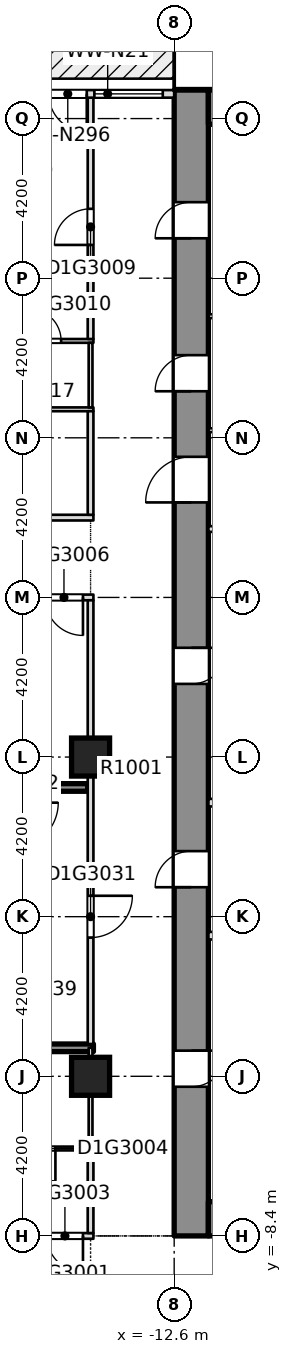
"""IFC4 building model, lengths in metres.
Left out: names, types, materials, properties, quantities, classifications, styles, units other than length and angle.
Written with IfcOpenShell. Run it as: python <this file> out.ifc"""

import sys

from ifc_helpers import new_model, si_unit, direction, frame, frame_2d, origin, origin_2d, place, context, subcontext, project, spatial, rectangle, extrude, element, fill, save


model = new_model("IFC4")
c1 = context("Model", 3, precision=1e-05, world=origin(), true_north=direction((0.0, 1.0)))
c2 = subcontext(c1, "Body", "Model", "MODEL_VIEW")
j1 = project(units=[si_unit("LENGTHUNIT", "METRE"), si_unit("PLANEANGLEUNIT", "RADIAN")], contexts=[c1])
p1 = place(None, origin())
s1 = spatial("IfcSite", under=j1, at=p1, CompositionType="ELEMENT")
p2 = place(p1, origin())
s2 = spatial("IfcBuilding", under=s1, at=p2, CompositionType="ELEMENT")
p3 = place(p2, frame((0.0, 0.0, 48.3)))
s3 = spatial("IfcBuildingStorey", under=s2, at=p3, CompositionType="ELEMENT", Elevation=48.3)
p4 = place(p3, frame((-12.15, -8.4, -0.32), z_axis=(0.0, 0.0, 1.0), x_axis=(0.0, 1.0, 0.0)))
e1 = element("IfcWall", 1, at=p4, inside=s3, PredefinedType="SHEAR", context=c2, shape_type="SweptSolid", body=[
    extrude(rectangle(XDim=30.15, YDim=0.9, at=frame_2d((15.075, 0.0))), origin(), (0.0, 0.0, 1.0), 3.45),
])
p5 = place(p4, frame((3.925, 0.0, 0.32)))
e2 = element("IfcOpeningElement", 2, at=p5, cuts=e1, PredefinedType="OPENING", context=c2, shape_type="SweptSolid", body=[
    extrude(rectangle(XDim=0.95, YDim=2.1, at=frame_2d((0.475, 1.05))), frame((0.0, 0.46, 0.0), z_axis=(0.0, -1.0, 0.0), x_axis=(1.0, 0.0, 0.0)), (0.0, 0.0, 1.0), 0.92),
])
p6 = place(p4, frame((9.175, 0.0, 0.32)))
e3 = element("IfcOpeningElement", 3, at=p6, cuts=e1, PredefinedType="OPENING", context=c2, shape_type="SweptSolid", body=[
    extrude(rectangle(XDim=0.95, YDim=2.1, at=frame_2d((0.475, 1.05))), frame((0.0, 0.46, 0.0), z_axis=(0.0, -1.0, 0.0), x_axis=(1.0, 0.0, 0.0)), (0.0, 0.0, 1.0), 0.92),
])
p7 = place(p4, frame((14.525, 0.0, 0.32)))
e4 = element("IfcOpeningElement", 4, at=p7, cuts=e1, PredefinedType="OPENING", context=c2, shape_type="SweptSolid", body=[
    extrude(rectangle(XDim=0.95, YDim=2.1, at=frame_2d((0.475, 1.05))), frame((0.0, 0.46, 0.0), z_axis=(0.0, -1.0, 0.0), x_axis=(1.0, 0.0, 0.0)), (0.0, 0.0, 1.0), 0.92),
])
p8 = place(p4, frame((22.225, 0.0, 0.32)))
e5 = element("IfcOpeningElement", 5, at=p8, cuts=e1, PredefinedType="OPENING", context=c2, shape_type="SweptSolid", body=[
    extrude(rectangle(XDim=0.95, YDim=2.1, at=frame_2d((0.475, 1.05))), frame((0.0, 0.46, 0.0), z_axis=(0.0, -1.0, 0.0), x_axis=(1.0, 0.0, 0.0)), (0.0, 0.0, 1.0), 0.92),
])
p9 = place(p4, frame((26.25, 0.0, 0.32)))
e6 = element("IfcOpeningElement", 6, at=p9, cuts=e1, PredefinedType="OPENING", context=c2, shape_type="SweptSolid", body=[
    extrude(rectangle(XDim=0.95, YDim=2.1, at=frame_2d((0.475, 1.05))), frame((0.0, 0.46, 0.0), z_axis=(0.0, -1.0, 0.0), x_axis=(1.0, 0.0, 0.0)), (0.0, 0.0, 1.0), 0.92),
])
p10 = place(p4, frame((19.3, 0.0, 0.32)))
e7 = element("IfcOpeningElement", 7, at=p10, cuts=e1, PredefinedType="OPENING", context=c2, shape_type="SweptSolid", body=[
    extrude(rectangle(XDim=1.2, YDim=2.1, at=frame_2d((0.6, 1.05))), frame((0.0, 0.46, 0.0), z_axis=(0.0, -1.0, 0.0), x_axis=(1.0, 0.0, 0.0)), (0.0, 0.0, 1.0), 0.92),
])
p11 = place(p3, frame((-11.7, -7.95, -0.32), z_axis=(0.0, 0.0, 1.0), x_axis=(1.0, 0.0, 0.0)))
e8 = element("IfcWall", 8, at=p11, inside=s3, PredefinedType="SHEAR", context=c2, shape_type="SweptSolid", body=[
    extrude(rectangle(XDim=23.4, YDim=0.9, at=frame_2d((11.7, 0.0))), origin(), (0.0, 0.0, 1.0), 3.45),
])
p12 = place(p11, frame((6.95, 0.0, 0.32)))
e9 = element("IfcOpeningElement", 9, at=p12, cuts=e8, PredefinedType="OPENING", context=c2, shape_type="SweptSolid", body=[
    extrude(rectangle(XDim=1.8, YDim=2.1, at=frame_2d((0.9, 1.05))), frame((0.0, 0.46, 0.0), z_axis=(0.0, -1.0, 0.0), x_axis=(1.0, 0.0, 0.0)), (0.0, 0.0, 1.0), 0.92),
])
p13 = place(p11, frame((14.65, 0.0, 0.32)))
e10 = element("IfcOpeningElement", 10, at=p13, cuts=e8, PredefinedType="OPENING", context=c2, shape_type="SweptSolid", body=[
    extrude(rectangle(XDim=1.8, YDim=2.1, at=frame_2d((0.9, 1.05))), frame((0.0, 0.46, 0.0), z_axis=(0.0, -1.0, 0.0), x_axis=(1.0, 0.0, 0.0)), (0.0, 0.0, 1.0), 0.92),
])
p14 = place(p3, frame((-11.7, 21.3, -0.32), z_axis=(0.0, 0.0, 1.0), x_axis=(1.0, 0.0, 0.0)))
e11 = element("IfcWall", 11, at=p14, inside=s3, PredefinedType="SOLIDWALL", context=c2, shape_type="SweptSolid", body=[
    extrude(rectangle(XDim=23.4, YDim=0.9, at=frame_2d((11.7, 0.0))), origin(), (0.0, 0.0, 1.0), 3.45),
])
for number, where, z_axis, x_axis in (
    (12, (-14.8, -4.2, -0.32), (0.0, 0.0, 1.0), (1.0, 0.0, 0.0)),
    (13, (-14.8, 4.2, -0.32), (0.0, 0.0, 1.0), (1.0, 0.0, 0.0)),
):
    element("IfcColumn", number, at=place(p3, frame(where, z_axis=z_axis, x_axis=x_axis)), inside=s3, PredefinedType="COLUMN", context=c2, shape_type="SweptSolid", body=[
        extrude(rectangle(XDim=1.0, YDim=1.0, at=origin_2d()), origin(), (0.0, 0.0, 1.0), 3.45),
    ])
p15 = place(p3, frame((-25.75, -8.4, 0.0), z_axis=(0.0, 0.0, 1.0), x_axis=(1.0, 0.0, 0.0)))
e14 = element("IfcWall", 14, at=p15, inside=s3, PredefinedType="PARTITIONING", context=c2, shape_type="SweptSolid", body=[
    extrude(rectangle(XDim=11.025, YDim=0.15, at=frame_2d((5.512, 0.0))), origin(), (0.0, 0.0, 1.0), 3.13),
])
p16 = place(p15, frame((9.8, 0.0, 0.0)))
e15 = element("IfcOpeningElement", 15, at=p16, cuts=e14, PredefinedType="OPENING", context=c2, shape_type="SweptSolid", body=[
    extrude(rectangle(XDim=0.95, YDim=2.1, at=frame_2d((0.475, 1.05))), frame((0.0, 0.085, 0.0), z_axis=(0.0, -1.0, 0.0), x_axis=(1.0, 0.0, 0.0)), (0.0, 0.0, 1.0), 0.17),
])
p17 = place(p3, frame((-17.55, -6.1, 0.0), z_axis=(0.0, 0.0, 1.0), x_axis=(1.0, 0.0, 0.0)))
e16 = element("IfcWall", 16, at=p17, inside=s3, PredefinedType="PARTITIONING", context=c2, shape_type="SweptSolid", body=[
    extrude(rectangle(XDim=2.825, YDim=0.1, at=frame_2d((1.413, 0.0))), origin(), (0.0, 0.0, 1.0), 3.13),
])
p18 = place(p17, frame((0.975, 0.0, 0.0)))
e17 = element("IfcOpeningElement", 17, at=p18, cuts=e16, PredefinedType="OPENING", context=c2, shape_type="SweptSolid", body=[
    extrude(rectangle(XDim=0.85, YDim=2.1, at=frame_2d((0.425, 1.05))), frame((0.0, 0.06, 0.0), z_axis=(0.0, -1.0, 0.0), x_axis=(1.0, 0.0, 0.0)), (0.0, 0.0, 1.0), 0.12),
])
p19 = place(p3, frame((-17.55, -3.45, 0.0), z_axis=(0.0, 0.0, 1.0), x_axis=(1.0, 0.0, 0.0)))
e18 = element("IfcWall", 18, at=p19, inside=s3, PredefinedType="SOLIDWALL", context=c2, shape_type="SweptSolid", body=[
    extrude(rectangle(XDim=2.825, YDim=0.2, at=frame_2d((1.413, 0.0))), origin(), (0.0, 0.0, 1.0), 3.13),
])
p20 = place(p3, frame((-20.45, 3.4, 0.0), z_axis=(0.0, 0.0, 1.0), x_axis=(1.0, 0.0, 0.0)))
e19 = element("IfcWall", 19, at=p20, inside=s3, PredefinedType="SOLIDWALL", context=c2, shape_type="SweptSolid", body=[
    extrude(rectangle(XDim=5.575, YDim=0.2, at=frame_2d((2.788, 0.0))), origin(), (0.0, 0.0, 1.0), 3.13),
])
p21 = place(p3, frame((-25.75, 8.4, 0.0), z_axis=(0.0, 0.0, 1.0), x_axis=(1.0, 0.0, 0.0)))
e20 = element("IfcWall", 20, at=p21, inside=s3, PredefinedType="PARTITIONING", context=c2, shape_type="SweptSolid", body=[
    extrude(rectangle(XDim=11.025, YDim=0.15, at=frame_2d((5.512, 0.0))), origin(), (0.0, 0.0, 1.0), 3.13),
])
p22 = place(p21, frame((9.75, 0.0, 0.0)))
e21 = element("IfcOpeningElement", 21, at=p22, cuts=e20, PredefinedType="OPENING", context=c2, shape_type="SweptSolid", body=[
    extrude(rectangle(XDim=1.0, YDim=2.1, at=frame_2d((0.5, 1.05))), frame((0.0, 0.085, 0.0), z_axis=(0.0, -1.0, 0.0), x_axis=(1.0, 0.0, 0.0)), (0.0, 0.0, 1.0), 0.17),
])
p23 = place(p3, frame((-25.75, 10.5, 0.0), z_axis=(0.0, 0.0, 1.0), x_axis=(1.0, 0.0, 0.0)))
e22 = element("IfcWall", 22, at=p23, inside=s3, PredefinedType="PARTITIONING", context=c2, shape_type="SweptSolid", body=[
    extrude(rectangle(XDim=11.025, YDim=0.15, at=frame_2d((5.512, 0.0))), origin(), (0.0, 0.0, 1.0), 3.13),
])
p24 = place(p23, frame((4.875, 0.0, 0.0)))
e23 = element("IfcOpeningElement", 23, at=p24, cuts=e22, PredefinedType="OPENING", context=c2, shape_type="SweptSolid", body=[
    extrude(rectangle(XDim=1.0, YDim=2.1, at=frame_2d((0.5, 1.05))), frame((0.0, 0.085, 0.0), z_axis=(0.0, -1.0, 0.0), x_axis=(1.0, 0.0, 0.0)), (0.0, 0.0, 1.0), 0.17),
])
p25 = place(p3, frame((-17.25, 13.35, 0.0), z_axis=(0.0, 0.0, 1.0), x_axis=(1.0, 0.0, 0.0)))
e24 = element("IfcWall", 24, at=p25, inside=s3, PredefinedType="PARTITIONING", context=c2, shape_type="SweptSolid", body=[
    extrude(rectangle(XDim=2.525, YDim=0.1, at=frame_2d((1.262, 0.0))), origin(), (0.0, 0.0, 1.0), 3.13),
])
p26 = place(p3, frame((-17.25, 15.15, 0.0), z_axis=(0.0, 0.0, 1.0), x_axis=(1.0, 0.0, 0.0)))
e25 = element("IfcWall", 25, at=p26, inside=s3, PredefinedType="PARTITIONING", context=c2, shape_type="SweptSolid", body=[
    extrude(rectangle(XDim=2.525, YDim=0.1, at=frame_2d((1.262, 0.0))), origin(), (0.0, 0.0, 1.0), 3.13),
])
p27 = place(p26, frame((0.825, 0.0, 0.0)))
e26 = element("IfcOpeningElement", 26, at=p27, cuts=e25, PredefinedType="OPENING", context=c2, shape_type="SweptSolid", body=[
    extrude(rectangle(XDim=0.85, YDim=2.1, at=frame_2d((0.425, 1.05))), frame((0.0, 0.06, 0.0), z_axis=(0.0, -1.0, 0.0), x_axis=(1.0, 0.0, 0.0)), (0.0, 0.0, 1.0), 0.12),
])
p28 = place(p3, frame((-14.8, -8.325, 0.0), z_axis=(0.0, 0.0, 1.0), x_axis=(0.0, 1.0, 0.0)))
e27 = element("IfcWall", 27, at=p28, inside=s3, PredefinedType="PARTITIONING", context=c2, shape_type="SweptSolid", body=[
    extrude(rectangle(XDim=2.175, YDim=0.15, at=frame_2d((1.087, 0.0))), origin(), (0.0, 0.0, 1.0), 3.13),
])
p29 = place(p3, frame((-14.8, -6.05, 0.0), z_axis=(0.0, 0.0, 1.0), x_axis=(0.0, 1.0, 0.0)))
e28 = element("IfcWall", 28, at=p29, inside=s3, PredefinedType="PARTITIONING", context=c2, shape_type="SweptSolid", body=[
    extrude(rectangle(XDim=2.6, YDim=0.1, at=frame_2d((1.3, 0.0))), origin(), (0.0, 0.0, 1.0), 3.13),
])
p30 = place(p3, frame((-14.8, -3.35, 0.0), z_axis=(0.0, 0.0, 1.0), x_axis=(0.0, 1.0, 0.0)))
e29 = element("IfcWall", 29, at=p30, inside=s3, PredefinedType="PARTITIONING", context=c2, shape_type="SweptSolid", body=[
    extrude(rectangle(XDim=11.675, YDim=0.15, at=frame_2d((5.837, 0.0))), origin(), (0.0, 0.0, 1.0), 3.13),
])
p31 = place(p30, frame((2.8, 0.0, 0.0)))
e30 = element("IfcOpeningElement", 30, at=p31, cuts=e29, PredefinedType="OPENING", context=c2, shape_type="SweptSolid", body=[
    extrude(rectangle(XDim=1.1, YDim=2.1, at=frame_2d((0.55, 1.05))), frame((0.0, 0.085, 0.0), z_axis=(0.0, -1.0, 0.0), x_axis=(1.0, 0.0, 0.0)), (0.0, 0.0, 1.0), 0.17),
])
p32 = place(p3, frame((-14.8, 10.575, 0.0), z_axis=(0.0, 0.0, 1.0), x_axis=(0.0, 1.0, 0.0)))
e31 = element("IfcWall", 31, at=p32, inside=s3, PredefinedType="PARTITIONING", context=c2, shape_type="SweptSolid", body=[
    extrude(rectangle(XDim=2.725, YDim=0.15, at=frame_2d((1.363, 0.0))), origin(), (0.0, 0.0, 1.0), 3.13),
])
p33 = place(p3, frame((-14.8, 13.4, 0.0), z_axis=(0.0, 0.0, 1.0), x_axis=(0.0, 1.0, 0.0)))
e32 = element("IfcWall", 32, at=p33, inside=s3, PredefinedType="PARTITIONING", context=c2, shape_type="SweptSolid", body=[
    extrude(rectangle(XDim=1.7, YDim=0.1, at=frame_2d((0.85, 0.0))), origin(), (0.0, 0.0, 1.0), 3.13),
])
p34 = place(p3, frame((-14.8, 15.2, 0.0), z_axis=(0.0, 0.0, 1.0), x_axis=(0.0, 1.0, 0.0)))
e33 = element("IfcWall", 33, at=p34, inside=s3, PredefinedType="PARTITIONING", context=c2, shape_type="SweptSolid", body=[
    extrude(rectangle(XDim=6.35, YDim=0.15, at=frame_2d((3.175, 0.0))), origin(), (0.0, 0.0, 1.0), 3.13),
])
p35 = place(p34, frame((2.475, 0.0, 0.0)))
e34 = element("IfcOpeningElement", 34, at=p35, cuts=e33, PredefinedType="OPENING", context=c2, shape_type="SweptSolid", body=[
    extrude(rectangle(XDim=0.95, YDim=2.1, at=frame_2d((0.475, 1.05))), frame((0.0, 0.085, 0.0), z_axis=(0.0, -1.0, 0.0), x_axis=(1.0, 0.0, 0.0)), (0.0, 0.0, 1.0), 0.17),
])
p36 = place(p3, frame((-12.6, 21.65, 0.0), z_axis=(0.0, 0.0, 1.0), x_axis=(-1.0, 0.0, 0.0)))
e35 = element("IfcWall", 35, at=p36, inside=s3, PredefinedType="STANDARD", context=c2, shape_type="SweptSolid", body=[
    extrude(rectangle(XDim=3.5, YDim=0.2, at=frame_2d((1.75, 0.0))), origin(), (0.0, 0.0, 1.0), 3.13),
])
p37 = place(p36, frame((0.3, 0.0, 0.2)))
e36 = element("IfcOpeningElement", 36, at=p37, cuts=e35, PredefinedType="OPENING", context=c2, shape_type="SweptSolid", body=[
    extrude(rectangle(XDim=1.8, YDim=2.65, at=frame_2d((0.9, 1.325))), frame((0.0, 0.11, 0.0), z_axis=(0.0, -1.0, 0.0), x_axis=(1.0, 0.0, 0.0)), (0.0, 0.0, 1.0), 0.22),
])
p38 = place(p36, frame((2.3, 0.0, 0.0)))
e37 = element("IfcOpeningElement", 37, at=p38, cuts=e35, PredefinedType="OPENING", context=c2, shape_type="SweptSolid", body=[
    extrude(rectangle(XDim=1.0, YDim=2.4, at=frame_2d((0.5, 1.2))), frame((0.0, 0.11, 0.0), z_axis=(0.0, -1.0, 0.0), x_axis=(1.0, 0.0, 0.0)), (0.0, 0.0, 1.0), 0.22),
])
for number, where, z_axis, x_axis in (
    (38, (-11.699, -0.5, 0.0), (0.0, 0.0, 1.0), (1.0, 0.0, 0.0)),
    (39, (-11.699, 3.0, 0.0), (0.0, 0.0, 1.0), (1.0, 0.0, 0.0)),
):
    element("IfcWall", number, at=place(p3, frame(where, z_axis=z_axis, x_axis=x_axis)), inside=s3, PredefinedType="PARTITIONING", context=c2, shape_type="SweptSolid", body=[
        extrude(rectangle(XDim=2.848, YDim=0.2, at=frame_2d((1.424, 0.0))), origin(), (0.0, 0.0, 1.0), 3.13),
    ])
p39 = place(p3, frame((-11.699, 10.2, 0.0), z_axis=(0.0, 0.0, 1.0), x_axis=(1.0, 0.0, 0.0)))
e40 = element("IfcWall", 40, at=p39, inside=s3, PredefinedType="PARTITIONING", context=c2, shape_type="SweptSolid", body=[
    extrude(rectangle(XDim=2.848, YDim=0.15, at=frame_2d((1.424, 0.0))), origin(), (0.0, 0.0, 1.0), 3.13),
])
for number, where, z_axis, x_axis in (
    (41, (-11.699, 12.8, 0.0), (0.0, 0.0, 1.0), (1.0, 0.0, 0.0)),
    (42, (-11.699, 15.8, 0.0), (0.0, 0.0, 1.0), (1.0, 0.0, 0.0)),
):
    element("IfcWall", number, at=place(p3, frame(where, z_axis=z_axis, x_axis=x_axis)), inside=s3, PredefinedType="PARTITIONING", context=c2, shape_type="SweptSolid", body=[
        extrude(rectangle(XDim=2.848, YDim=0.1, at=frame_2d((1.424, 0.0))), origin(), (0.0, 0.0, 1.0), 3.13),
    ])
p40 = place(p16, origin())
e43 = element("IfcDoor", 43, at=p40, inside=s3, OperationType="SINGLE_SWING_LEFT", PredefinedType="DOOR", context=c2, shape_type="SweptSolid", body=[
    extrude(rectangle(XDim=0.95, YDim=2.1, at=frame_2d((0.475, 1.05))), frame((0.0, 0.025, 0.0), z_axis=(0.0, -1.0, 0.0), x_axis=(1.0, 0.0, 0.0)), (0.0, 0.0, 1.0), 0.05),
])
fill(e15, e43)
p41 = place(p18, origin())
e44 = element("IfcDoor", 44, at=p41, inside=s3, OperationType="SINGLE_SWING_LEFT", PredefinedType="DOOR", context=c2, shape_type="SweptSolid", body=[
    extrude(rectangle(XDim=0.85, YDim=2.1, at=frame_2d((0.425, 1.05))), frame((0.0, 0.025, 0.0), z_axis=(0.0, -1.0, 0.0), x_axis=(1.0, 0.0, 0.0)), (0.0, 0.0, 1.0), 0.05),
])
fill(e17, e44)
p42 = place(p22, origin())
e45 = element("IfcDoor", 45, at=p42, inside=s3, OperationType="SINGLE_SWING_RIGHT", PredefinedType="DOOR", context=c2, shape_type="SweptSolid", body=[
    extrude(rectangle(XDim=1.0, YDim=2.1, at=frame_2d((0.5, 1.05))), frame((0.0, 0.025, 0.0), z_axis=(0.0, -1.0, 0.0), x_axis=(1.0, 0.0, 0.0)), (0.0, 0.0, 1.0), 0.05),
])
fill(e21, e45)
p43 = place(p35, origin())
e46 = element("IfcDoor", 46, at=p43, inside=s3, OperationType="SINGLE_SWING_RIGHT", PredefinedType="DOOR", context=c2, shape_type="SweptSolid", body=[
    extrude(rectangle(XDim=0.95, YDim=2.1, at=frame_2d((0.475, 1.05))), frame((0.0, 0.025, 0.0), z_axis=(0.0, -1.0, 0.0), x_axis=(1.0, 0.0, 0.0)), (0.0, 0.0, 1.0), 0.05),
])
fill(e34, e46)
p44 = place(p27, origin())
e47 = element("IfcDoor", 47, at=p44, inside=s3, OperationType="SINGLE_SWING_RIGHT", PredefinedType="DOOR", context=c2, shape_type="SweptSolid", body=[
    extrude(rectangle(XDim=0.85, YDim=2.1, at=frame_2d((0.425, 1.05))), frame((0.0, 0.025, 0.0), z_axis=(0.0, -1.0, 0.0), x_axis=(1.0, 0.0, 0.0)), (0.0, 0.0, 1.0), 0.05),
])
fill(e26, e47)
p45 = place(p31, origin())
e48 = element("IfcDoor", 48, at=p45, inside=s3, OperationType="SINGLE_SWING_RIGHT", PredefinedType="DOOR", context=c2, shape_type="SweptSolid", body=[
    extrude(rectangle(XDim=1.1, YDim=2.1, at=frame_2d((0.55, 1.05))), frame((0.0, 0.025, 0.0), z_axis=(0.0, -1.0, 0.0), x_axis=(1.0, 0.0, 0.0)), (0.0, 0.0, 1.0), 0.05),
])
fill(e30, e48)
p46 = place(p37, origin())
e49 = element("IfcWindow", 49, at=p46, inside=s3, PartitioningType="SINGLE_PANEL", PredefinedType="WINDOW", context=c2, shape_type="SweptSolid", body=[
    extrude(rectangle(XDim=1.8, YDim=2.65, at=frame_2d((0.9, 1.325))), frame((0.0, 0.03, 0.0), z_axis=(0.0, -1.0, 0.0), x_axis=(1.0, 0.0, 0.0)), (0.0, 0.0, 1.0), 0.06),
])
fill(e36, e49)
p47 = place(p38, origin())
e50 = element("IfcDoor", 50, at=p47, inside=s3, OperationType="SINGLE_SWING_LEFT", PredefinedType="DOOR", context=c2, shape_type="SweptSolid", body=[
    extrude(rectangle(XDim=1.0, YDim=2.4, at=frame_2d((0.5, 1.2))), frame((0.0, 0.025, 0.0), z_axis=(0.0, -1.0, 0.0), x_axis=(1.0, 0.0, 0.0)), (0.0, 0.0, 1.0), 0.05),
])
fill(e37, e50)
p48 = place(p5, origin())
e51 = element("IfcDoor", 51, at=p48, inside=s3, OperationType="SINGLE_SWING_LEFT", PredefinedType="DOOR", context=c2, shape_type="SweptSolid", body=[
    extrude(rectangle(XDim=0.95, YDim=2.1, at=frame_2d((0.475, 1.05))), frame((0.0, 0.025, 0.0), z_axis=(0.0, -1.0, 0.0), x_axis=(1.0, 0.0, 0.0)), (0.0, 0.0, 1.0), 0.05),
])
fill(e2, e51)
p49 = place(p6, origin())
e52 = element("IfcDoor", 52, at=p49, inside=s3, OperationType="SINGLE_SWING_LEFT", PredefinedType="DOOR", context=c2, shape_type="SweptSolid", body=[
    extrude(rectangle(XDim=0.95, YDim=2.1, at=frame_2d((0.475, 1.05))), frame((0.0, 0.025, 0.0), z_axis=(0.0, -1.0, 0.0), x_axis=(1.0, 0.0, 0.0)), (0.0, 0.0, 1.0), 0.05),
])
fill(e3, e52)
p50 = place(p7, origin())
e53 = element("IfcDoor", 53, at=p50, inside=s3, OperationType="SINGLE_SWING_LEFT", PredefinedType="DOOR", context=c2, shape_type="SweptSolid", body=[
    extrude(rectangle(XDim=0.95, YDim=2.1, at=frame_2d((0.475, 1.05))), frame((0.0, 0.025, 0.0), z_axis=(0.0, -1.0, 0.0), x_axis=(1.0, 0.0, 0.0)), (0.0, 0.0, 1.0), 0.05),
])
fill(e4, e53)
p51 = place(p8, origin())
e54 = element("IfcDoor", 54, at=p51, inside=s3, OperationType="SINGLE_SWING_LEFT", PredefinedType="DOOR", context=c2, shape_type="SweptSolid", body=[
    extrude(rectangle(XDim=0.95, YDim=2.1, at=frame_2d((0.475, 1.05))), frame((0.0, 0.025, 0.0), z_axis=(0.0, -1.0, 0.0), x_axis=(1.0, 0.0, 0.0)), (0.0, 0.0, 1.0), 0.05),
])
fill(e5, e54)
p52 = place(p9, origin())
e55 = element("IfcDoor", 55, at=p52, inside=s3, OperationType="SINGLE_SWING_LEFT", PredefinedType="DOOR", context=c2, shape_type="SweptSolid", body=[
    extrude(rectangle(XDim=0.95, YDim=2.1, at=frame_2d((0.475, 1.05))), frame((0.0, 0.025, 0.0), z_axis=(0.0, -1.0, 0.0), x_axis=(1.0, 0.0, 0.0)), (0.0, 0.0, 1.0), 0.05),
])
fill(e6, e55)
p53 = place(p10, origin())
e56 = element("IfcDoor", 56, at=p53, inside=s3, OperationType="SINGLE_SWING_LEFT", PredefinedType="DOOR", context=c2, shape_type="SweptSolid", body=[
    extrude(rectangle(XDim=1.2, YDim=2.1, at=frame_2d((0.6, 1.05))), frame((0.0, 0.025, 0.0), z_axis=(0.0, -1.0, 0.0), x_axis=(1.0, 0.0, 0.0)), (0.0, 0.0, 1.0), 0.05),
])
fill(e7, e56)
save(model, sys.argv[1])
